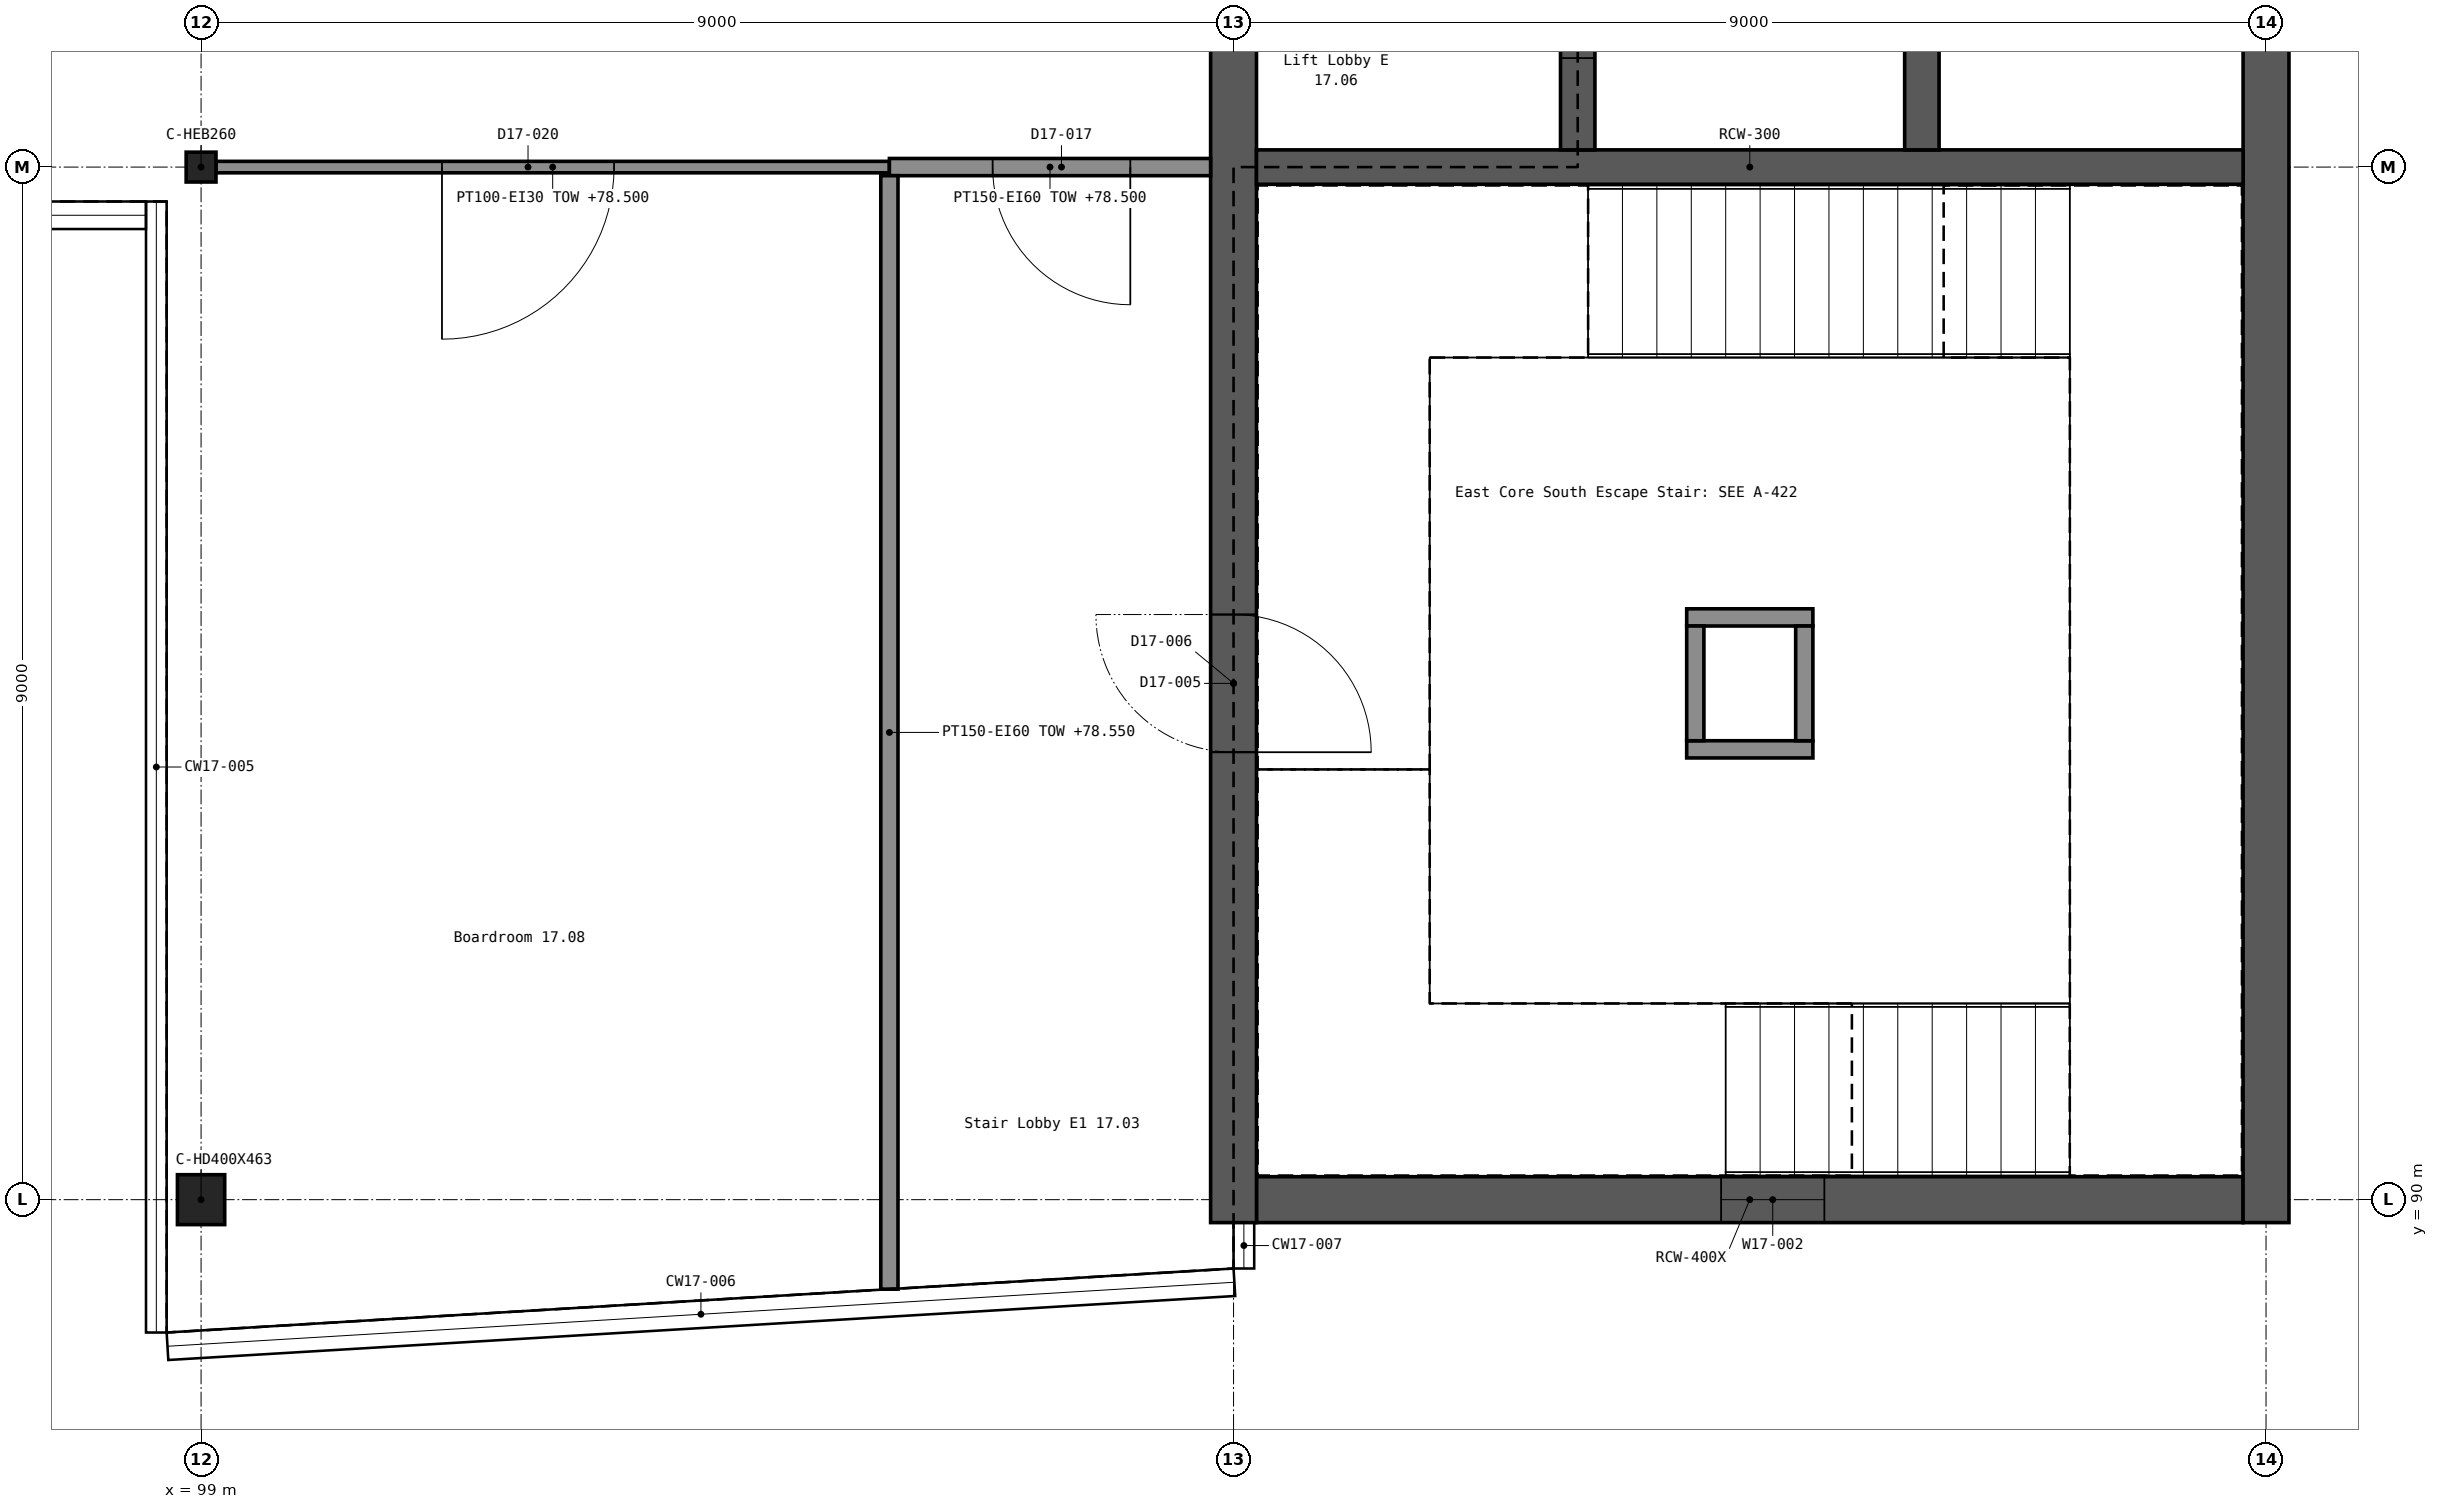
"""IFC4 building model, lengths in metres.
Left out: names, types, materials, properties, quantities, classifications, styles, units other than length and angle.
Written with IfcOpenShell. Run it as: python <this file> out.ifc"""

import sys

from ifc_helpers import new_model, si_unit, direction, frame, frame_2d, origin, origin_2d, place, context, subcontext, project, spatial, rectangle, i_section, extrude, element, fill, save


model = new_model("IFC4")
c1 = context("Model", 3, precision=1e-05, world=origin(), true_north=direction((0.0, 1.0)))
c2 = subcontext(c1, "Body", "Model", "MODEL_VIEW")
j1 = project(units=[si_unit("LENGTHUNIT", "METRE"), si_unit("PLANEANGLEUNIT", "RADIAN")], contexts=[c1])
p1 = place(None, origin())
s1 = spatial("IfcSite", under=j1, at=p1, CompositionType="ELEMENT")
p2 = place(p1, origin())
s2 = spatial("IfcBuilding", under=s1, at=p2, CompositionType="ELEMENT")
p3 = place(p2, frame((0.0, 0.0, 75.3)))
s3 = spatial("IfcBuildingStorey", under=s2, at=p3, CompositionType="ELEMENT", Elevation=75.3)
p4 = place(p3, frame((108.2, 90.0, 0.0), z_axis=(0.0, 0.0, 1.0), x_axis=(1.0, 0.0, 0.0)))
e1 = element("IfcWall", 1, at=p4, inside=s3, PredefinedType="SHEAR", context=c2, shape_type="SweptSolid", body=[
    extrude(rectangle(XDim=8.6, YDim=0.4, at=frame_2d((4.3, 0.0))), origin(), (0.0, 0.0, 1.0), 7.5),
])
p5 = place(p4, frame((4.05, 0.0, 1.2)))
e2 = element("IfcOpeningElement", 2, at=p5, cuts=e1, PredefinedType="OPENING", context=c2, shape_type="SweptSolid", body=[
    extrude(rectangle(XDim=0.9, YDim=1.5, at=frame_2d((0.45, 0.75))), frame((0.0, 0.211, 0.0), z_axis=(0.0, -1.0, 0.0), x_axis=(1.0, 0.0, 0.0)), (0.0, 0.0, 1.0), 0.422),
])
p6 = place(p3, frame((108.0, 89.8, 0.0), z_axis=(0.0, 0.0, 1.0), x_axis=(0.0, 1.0, 0.0)))
e3 = element("IfcWall", 3, at=p6, inside=s3, PredefinedType="SHEAR", context=c2, shape_type="SweptSolid", body=[
    extrude(rectangle(XDim=27.4, YDim=0.4, at=frame_2d((13.7, 0.0))), origin(), (0.0, 0.0, 1.0), 7.5),
])
p7 = place(p6, frame((4.1, 0.0, 0.0)))
e4 = element("IfcOpeningElement", 4, at=p7, cuts=e3, PredefinedType="OPENING", context=c2, shape_type="SweptSolid", body=[
    extrude(rectangle(XDim=1.2, YDim=2.1, at=frame_2d((0.6, 1.05))), frame((0.0, 0.211, 0.0), z_axis=(0.0, -1.0, 0.0), x_axis=(1.0, 0.0, 0.0)), (0.0, 0.0, 1.0), 0.422),
])
p8 = place(p6, frame((4.1, 0.0, 3.9)))
e5 = element("IfcOpeningElement", 5, at=p8, cuts=e3, PredefinedType="OPENING", context=c2, shape_type="SweptSolid", body=[
    extrude(rectangle(XDim=1.2, YDim=2.1, at=frame_2d((0.6, 1.05))), frame((0.0, 0.211, 0.0), z_axis=(0.0, -1.0, 0.0), x_axis=(1.0, 0.0, 0.0)), (0.0, 0.0, 1.0), 0.422),
])
p9 = place(p6, frame((22.1, 0.0, 0.0)))
e6 = element("IfcOpeningElement", 6, at=p9, cuts=e3, PredefinedType="OPENING", context=c2, shape_type="SweptSolid", body=[
    extrude(rectangle(XDim=1.2, YDim=2.1, at=frame_2d((0.6, 1.05))), frame((0.0, 0.211, 0.0), z_axis=(0.0, -1.0, 0.0), x_axis=(1.0, 0.0, 0.0)), (0.0, 0.0, 1.0), 0.422),
])
p10 = place(p6, frame((22.1, 0.0, 3.9)))
e7 = element("IfcOpeningElement", 7, at=p10, cuts=e3, PredefinedType="OPENING", context=c2, shape_type="SweptSolid", body=[
    extrude(rectangle(XDim=1.2, YDim=2.1, at=frame_2d((0.6, 1.05))), frame((0.0, 0.211, 0.0), z_axis=(0.0, -1.0, 0.0), x_axis=(1.0, 0.0, 0.0)), (0.0, 0.0, 1.0), 0.422),
])
p11 = place(p6, frame((12.5, 0.0, 0.0)))
e8 = element("IfcOpeningElement", 8, at=p11, cuts=e3, PredefinedType="OPENING", context=c2, shape_type="SweptSolid", body=[
    extrude(rectangle(XDim=2.0, YDim=2.1, at=frame_2d((1.0, 1.05))), frame((0.0, 0.211, 0.0), z_axis=(0.0, -1.0, 0.0), x_axis=(1.0, 0.0, 0.0)), (0.0, 0.0, 1.0), 0.422),
])
p12 = place(p3, frame((117.0, 89.8, 0.0), z_axis=(0.0, 0.0, 1.0), x_axis=(0.0, 1.0, 0.0)))
e9 = element("IfcWall", 9, at=p12, inside=s3, PredefinedType="SHEAR", context=c2, shape_type="SweptSolid", body=[
    extrude(rectangle(XDim=27.4, YDim=0.4, at=frame_2d((13.7, 0.0))), origin(), (0.0, 0.0, 1.0), 7.5),
])
p13 = place(p3, frame((108.2, 99.0, 0.0), z_axis=(0.0, 0.0, 1.0), x_axis=(1.0, 0.0, 0.0)))
e10 = element("IfcWall", 10, at=p13, inside=s3, PredefinedType="SHEAR", context=c2, shape_type="SweptSolid", body=[
    extrude(rectangle(XDim=8.6, YDim=0.3, at=frame_2d((4.3, 0.0))), origin(), (0.0, 0.0, 1.0), 7.5),
])
p14 = place(p3, frame((111.0, 99.15, 0.0), z_axis=(0.0, 0.0, 1.0), x_axis=(0.0, 1.0, 0.0)))
e11 = element("IfcWall", 11, at=p14, inside=s3, PredefinedType="SHEAR", context=c2, shape_type="SweptSolid", body=[
    extrude(rectangle(XDim=8.7, YDim=0.3, at=frame_2d((4.35, 0.0))), origin(), (0.0, 0.0, 1.0), 7.5),
])
p15 = place(p14, frame((0.8, 0.0, 0.0)))
e12 = element("IfcOpeningElement", 12, at=p15, cuts=e11, PredefinedType="OPENING", context=c2, shape_type="SweptSolid", body=[
    extrude(rectangle(XDim=1.1, YDim=2.1, at=frame_2d((0.55, 1.05))), frame((0.0, 0.161, 0.0), z_axis=(0.0, -1.0, 0.0), x_axis=(1.0, 0.0, 0.0)), (0.0, 0.0, 1.0), 0.322),
])
p16 = place(p14, frame((3.8, 0.0, 0.0)))
e13 = element("IfcOpeningElement", 13, at=p16, cuts=e11, PredefinedType="OPENING", context=c2, shape_type="SweptSolid", body=[
    extrude(rectangle(XDim=1.1, YDim=2.1, at=frame_2d((0.55, 1.05))), frame((0.0, 0.161, 0.0), z_axis=(0.0, -1.0, 0.0), x_axis=(1.0, 0.0, 0.0)), (0.0, 0.0, 1.0), 0.322),
])
p17 = place(p14, frame((6.8, 0.0, 0.0)))
e14 = element("IfcOpeningElement", 14, at=p17, cuts=e11, PredefinedType="OPENING", context=c2, shape_type="SweptSolid", body=[
    extrude(rectangle(XDim=1.1, YDim=2.1, at=frame_2d((0.55, 1.05))), frame((0.0, 0.161, 0.0), z_axis=(0.0, -1.0, 0.0), x_axis=(1.0, 0.0, 0.0)), (0.0, 0.0, 1.0), 0.322),
])
p18 = place(p3, frame((114.0, 99.15, 0.0), z_axis=(0.0, 0.0, 1.0), x_axis=(0.0, 1.0, 0.0)))
e15 = element("IfcWall", 15, at=p18, inside=s3, PredefinedType="SHEAR", context=c2, shape_type="SweptSolid", body=[
    extrude(rectangle(XDim=8.7, YDim=0.3, at=frame_2d((4.35, 0.0))), origin(), (0.0, 0.0, 1.0), 7.5),
])
p19 = place(p3, frame((99.0, 90.0, 0.0), z_axis=(0.0, 0.0, 1.0), x_axis=(1.0, 0.0, 0.0)))
e16 = element("IfcColumn", 16, at=p19, inside=s3, PredefinedType="COLUMN", context=c2, shape_type="SweptSolid", body=[
    extrude(i_section(OverallWidth=0.412, OverallDepth=0.435, WebThickness=0.036, FlangeThickness=0.057, FilletRadius=0.015, at=origin_2d()), origin(), (0.0, 0.0, 1.0), 3.9),
])
p20 = place(p3, frame((99.0, 99.0, 0.0), z_axis=(0.0, 0.0, 1.0), x_axis=(1.0, 0.0, 0.0)))
e17 = element("IfcColumn", 17, at=p20, inside=s3, PredefinedType="COLUMN", context=c2, shape_type="SweptSolid", body=[
    extrude(i_section(OverallWidth=0.26, OverallDepth=0.26, WebThickness=0.01, FlangeThickness=0.018, FilletRadius=0.024, at=origin_2d()), origin(), (0.0, 0.0, 1.0), 3.9),
])
p21 = place(p3, frame((95.947, 88.802, 3.9), z_axis=(0.0, 0.0, 1.0), x_axis=(0.998205931514, 0.059874187172, 0.0)))
e18 = element("IfcWall", 18, at=p21, inside=s3, PredefinedType="PARAPET", context=c2, shape_type="SweptSolid", body=[
    extrude(rectangle(XDim=2.956, YDim=0.25, at=frame_2d((1.478, 0.0))), origin(), (0.0, 0.0, 1.0), 1.1),
])
p22 = place(p3, frame((98.898, 88.979, 3.9), z_axis=(0.0, 0.0, 1.0), x_axis=(0.998200695393, 0.059961418572, 0.0)))
e19 = element("IfcWall", 19, at=p22, inside=s3, PredefinedType="PARAPET", context=c2, shape_type="SweptSolid", body=[
    extrude(rectangle(XDim=2.956, YDim=0.25, at=frame_2d((1.478, 0.0))), origin(), (0.0, 0.0, 1.0), 1.3),
])
p23 = place(p3, frame((101.849, 89.156, 3.9), z_axis=(0.0, 0.0, 1.0), x_axis=(0.998205635417, 0.059879123422, 0.0)))
e20 = element("IfcWall", 20, at=p23, inside=s3, PredefinedType="PARAPET", context=c2, shape_type="SweptSolid", body=[
    extrude(rectangle(XDim=2.956, YDim=0.25, at=frame_2d((1.478, 0.0))), origin(), (0.0, 0.0, 1.0), 1.6),
])
p24 = place(p3, frame((104.799, 89.333, 3.9), z_axis=(0.0, 0.0, 1.0), x_axis=(0.998205931514, 0.059874187172, 0.0)))
e21 = element("IfcWall", 21, at=p24, inside=s3, PredefinedType="PARAPET", context=c2, shape_type="SweptSolid", body=[
    extrude(rectangle(XDim=2.956, YDim=0.25, at=frame_2d((1.478, 0.0))), origin(), (0.0, 0.0, 1.0), 2.1),
])
p25 = place(p3, frame((107.875, 89.385, 3.9), z_axis=(0.0, 0.0, 1.0), x_axis=(0.0, 1.0, 0.0)))
e22 = element("IfcWall", 22, at=p25, inside=s3, PredefinedType="PARAPET", context=c2, shape_type="SweptSolid", body=[
    extrude(rectangle(XDim=0.415, YDim=0.25, at=frame_2d((0.208, 0.0))), origin(), (0.0, 0.0, 1.0), 1.1),
])
p26 = place(p3, frame((108.0, 89.85, 7.5), z_axis=(0.0, 0.0, 1.0), x_axis=(0.0, 1.0, 0.0)))
e23 = element("IfcWall", 23, at=p26, inside=s3, PredefinedType="PARAPET", context=c2, shape_type="SweptSolid", body=[
    extrude(rectangle(XDim=8.55, YDim=0.3, at=frame_2d((4.275, 0.0))), origin(), (0.0, 0.0, 1.0), 1.1),
])
p27 = place(p3, frame((117.0, 89.85, 7.5), z_axis=(0.0, 0.0, 1.0), x_axis=(0.0, 1.0, 0.0)))
e24 = element("IfcWall", 24, at=p27, inside=s3, PredefinedType="PARAPET", context=c2, shape_type="SweptSolid", body=[
    extrude(rectangle(XDim=27.3, YDim=0.3, at=frame_2d((13.65, 0.0))), origin(), (0.0, 0.0, 1.0), 1.1),
])
p28 = place(p3, frame((108.15, 90.0, 7.5), z_axis=(0.0, 0.0, 1.0), x_axis=(1.0, 0.0, 0.0)))
e25 = element("IfcWall", 25, at=p28, inside=s3, PredefinedType="PARAPET", context=c2, shape_type="SweptSolid", body=[
    extrude(rectangle(XDim=8.7, YDim=0.3, at=frame_2d((4.35, 0.0))), origin(), (0.0, 0.0, 1.0), 1.1),
])
for number, where, z_axis, x_axis in (
    (26, (111.95, 93.925, 7.5), (0.0, 0.0, 1.0), (1.0, 0.0, 0.0)),
    (27, (111.95, 95.075, 7.5), (0.0, 0.0, 1.0), (1.0, 0.0, 0.0)),
):
    element("IfcWall", number, at=place(p3, frame(where, z_axis=z_axis, x_axis=x_axis)), inside=s3, PredefinedType="SOLIDWALL", context=c2, shape_type="SweptSolid", body=[
        extrude(rectangle(XDim=1.1, YDim=0.15, at=frame_2d((0.55, 0.0))), origin(), (0.0, 0.0, 1.0), 0.15),
    ])
for number, where, z_axis, x_axis in (
    (28, (112.025, 94.0, 7.5), (0.0, 0.0, 1.0), (0.0, 1.0, 0.0)),
    (29, (112.975, 94.0, 7.5), (0.0, 0.0, 1.0), (0.0, 1.0, 0.0)),
):
    element("IfcWall", number, at=place(p3, frame(where, z_axis=z_axis, x_axis=x_axis)), inside=s3, PredefinedType="SOLIDWALL", context=c2, shape_type="SweptSolid", body=[
        extrude(rectangle(XDim=1.0, YDim=0.15, at=frame_2d((0.5, 0.0))), origin(), (0.0, 0.0, 1.0), 0.15),
    ])
p29 = place(p3, frame((99.13, 99.0, 0.0), z_axis=(0.0, 0.0, 1.0), x_axis=(1.0, 0.0, 0.0)))
e30 = element("IfcWall", 30, at=p29, inside=s3, PredefinedType="PARTITIONING", context=c2, shape_type="SweptSolid", body=[
    extrude(rectangle(XDim=5.87, YDim=0.1, at=frame_2d((2.935, 0.0))), origin(), (0.0, 0.0, 1.0), 3.2),
])
p30 = place(p29, frame((1.97, 0.0, 0.0)))
e31 = element("IfcOpeningElement", 31, at=p30, cuts=e30, PredefinedType="OPENING", context=c2, shape_type="SweptSolid", body=[
    extrude(rectangle(XDim=1.5, YDim=2.1, at=frame_2d((0.75, 1.05))), frame((0.0, 0.061, 0.0), z_axis=(0.0, -1.0, 0.0), x_axis=(1.0, 0.0, 0.0)), (0.0, 0.0, 1.0), 0.122),
])
p31 = place(p3, frame((105.0, 99.0, 0.0), z_axis=(0.0, 0.0, 1.0), x_axis=(1.0, 0.0, 0.0)))
e32 = element("IfcWall", 32, at=p31, inside=s3, PredefinedType="PARTITIONING", context=c2, shape_type="SweptSolid", body=[
    extrude(rectangle(XDim=2.8, YDim=0.15, at=frame_2d((1.4, 0.0))), origin(), (0.0, 0.0, 1.0), 3.2),
])
p32 = place(p31, frame((0.9, 0.0, 0.0)))
e33 = element("IfcOpeningElement", 33, at=p32, cuts=e32, PredefinedType="OPENING", context=c2, shape_type="SweptSolid", body=[
    extrude(rectangle(XDim=1.2, YDim=2.1, at=frame_2d((0.6, 1.05))), frame((0.0, 0.086, 0.0), z_axis=(0.0, -1.0, 0.0), x_axis=(1.0, 0.0, 0.0)), (0.0, 0.0, 1.0), 0.172),
])
p33 = place(p3, frame((105.0, 89.22, 0.0), z_axis=(0.0, 0.0, 1.0), x_axis=(0.0, 1.0, 0.0)))
e34 = element("IfcWall", 34, at=p33, inside=s3, PredefinedType="PARTITIONING", context=c2, shape_type="SweptSolid", body=[
    extrude(rectangle(XDim=9.705, YDim=0.15, at=frame_2d((4.853, 0.0))), origin(), (0.0, 0.0, 1.0), 3.25),
])
p34 = place(p5, origin())
e35 = element("IfcWindow", 35, at=p34, inside=s3, PartitioningType="SINGLE_PANEL", PredefinedType="WINDOW", context=c2, shape_type="SweptSolid", body=[
    extrude(rectangle(XDim=0.9, YDim=1.5, at=frame_2d((0.45, 0.75))), frame((0.0, 0.03, 0.0), z_axis=(0.0, -1.0, 0.0), x_axis=(1.0, 0.0, 0.0)), (0.0, 0.0, 1.0), 0.06),
])
fill(e2, e35)
p35 = place(p2, frame((0.0, 0.0, 82.5)))
p36 = place(p35, origin())
p37 = place(p36, frame((112.5, 94.5, 0.0)))
p38 = place(p37, frame((0.0, 0.0, 0.25)))
e36 = element("IfcWindow", 36, at=p38, inside=s3, PartitioningType="SINGLE_PANEL", PredefinedType="SKYLIGHT", context=c2, shape_type="SweptSolid", body=[
    extrude(rectangle(XDim=0.8, YDim=1.0, at=origin_2d()), origin(), (0.0, 0.0, 1.0), 0.05),
])
p39 = place(p7, frame((1.2, 0.0, 0.0), z_axis=(0.0, 0.0, 1.0), x_axis=(-1.0, 0.0, 0.0)))
e37 = element("IfcDoor", 37, at=p39, inside=s3, OperationType="SINGLE_SWING_RIGHT", PredefinedType="DOOR", context=c2, shape_type="SweptSolid", body=[
    extrude(rectangle(XDim=1.2, YDim=2.1, at=frame_2d((0.6, 1.05))), frame((0.0, 0.025, 0.0), z_axis=(0.0, -1.0, 0.0), x_axis=(1.0, 0.0, 0.0)), (0.0, 0.0, 1.0), 0.05),
])
fill(e4, e37)
p40 = place(p8, origin())
e38 = element("IfcDoor", 38, at=p40, inside=s3, OperationType="SINGLE_SWING_RIGHT", PredefinedType="DOOR", context=c2, shape_type="SweptSolid", body=[
    extrude(rectangle(XDim=1.2, YDim=2.1, at=frame_2d((0.6, 1.05))), frame((0.0, 0.025, 0.0), z_axis=(0.0, -1.0, 0.0), x_axis=(1.0, 0.0, 0.0)), (0.0, 0.0, 1.0), 0.05),
])
fill(e5, e38)
p41 = place(p15, origin())
e39 = element("IfcDoor", 39, at=p41, inside=s3, OperationType="DOUBLE_DOOR_SLIDING", PredefinedType="DOOR", context=c2, shape_type="SweptSolid", body=[
    extrude(rectangle(XDim=1.1, YDim=2.1, at=frame_2d((0.55, 1.05))), frame((0.0, 0.025, 0.0), z_axis=(0.0, -1.0, 0.0), x_axis=(1.0, 0.0, 0.0)), (0.0, 0.0, 1.0), 0.05),
])
fill(e12, e39)
p42 = place(p32, frame((1.2, 0.0, 0.0), z_axis=(0.0, 0.0, 1.0), x_axis=(-1.0, 0.0, 0.0)))
e40 = element("IfcDoor", 40, at=p42, inside=s3, OperationType="SINGLE_SWING_LEFT", PredefinedType="DOOR", context=c2, shape_type="SweptSolid", body=[
    extrude(rectangle(XDim=1.2, YDim=2.1, at=frame_2d((0.6, 1.05))), frame((0.0, 0.025, 0.0), z_axis=(0.0, -1.0, 0.0), x_axis=(1.0, 0.0, 0.0)), (0.0, 0.0, 1.0), 0.05),
])
fill(e33, e40)
p43 = place(p30, frame((1.5, 0.0, 0.0), z_axis=(0.0, 0.0, 1.0), x_axis=(-1.0, 0.0, 0.0)))
e41 = element("IfcDoor", 41, at=p43, inside=s3, OperationType="DOUBLE_DOOR_SINGLE_SWING", PredefinedType="DOOR", context=c2, shape_type="SweptSolid", body=[
    extrude(rectangle(XDim=1.5, YDim=2.1, at=frame_2d((0.75, 1.05))), frame((0.0, 0.025, 0.0), z_axis=(0.0, -1.0, 0.0), x_axis=(1.0, 0.0, 0.0)), (0.0, 0.0, 1.0), 0.05),
])
fill(e31, e41)
save(model, sys.argv[1])
